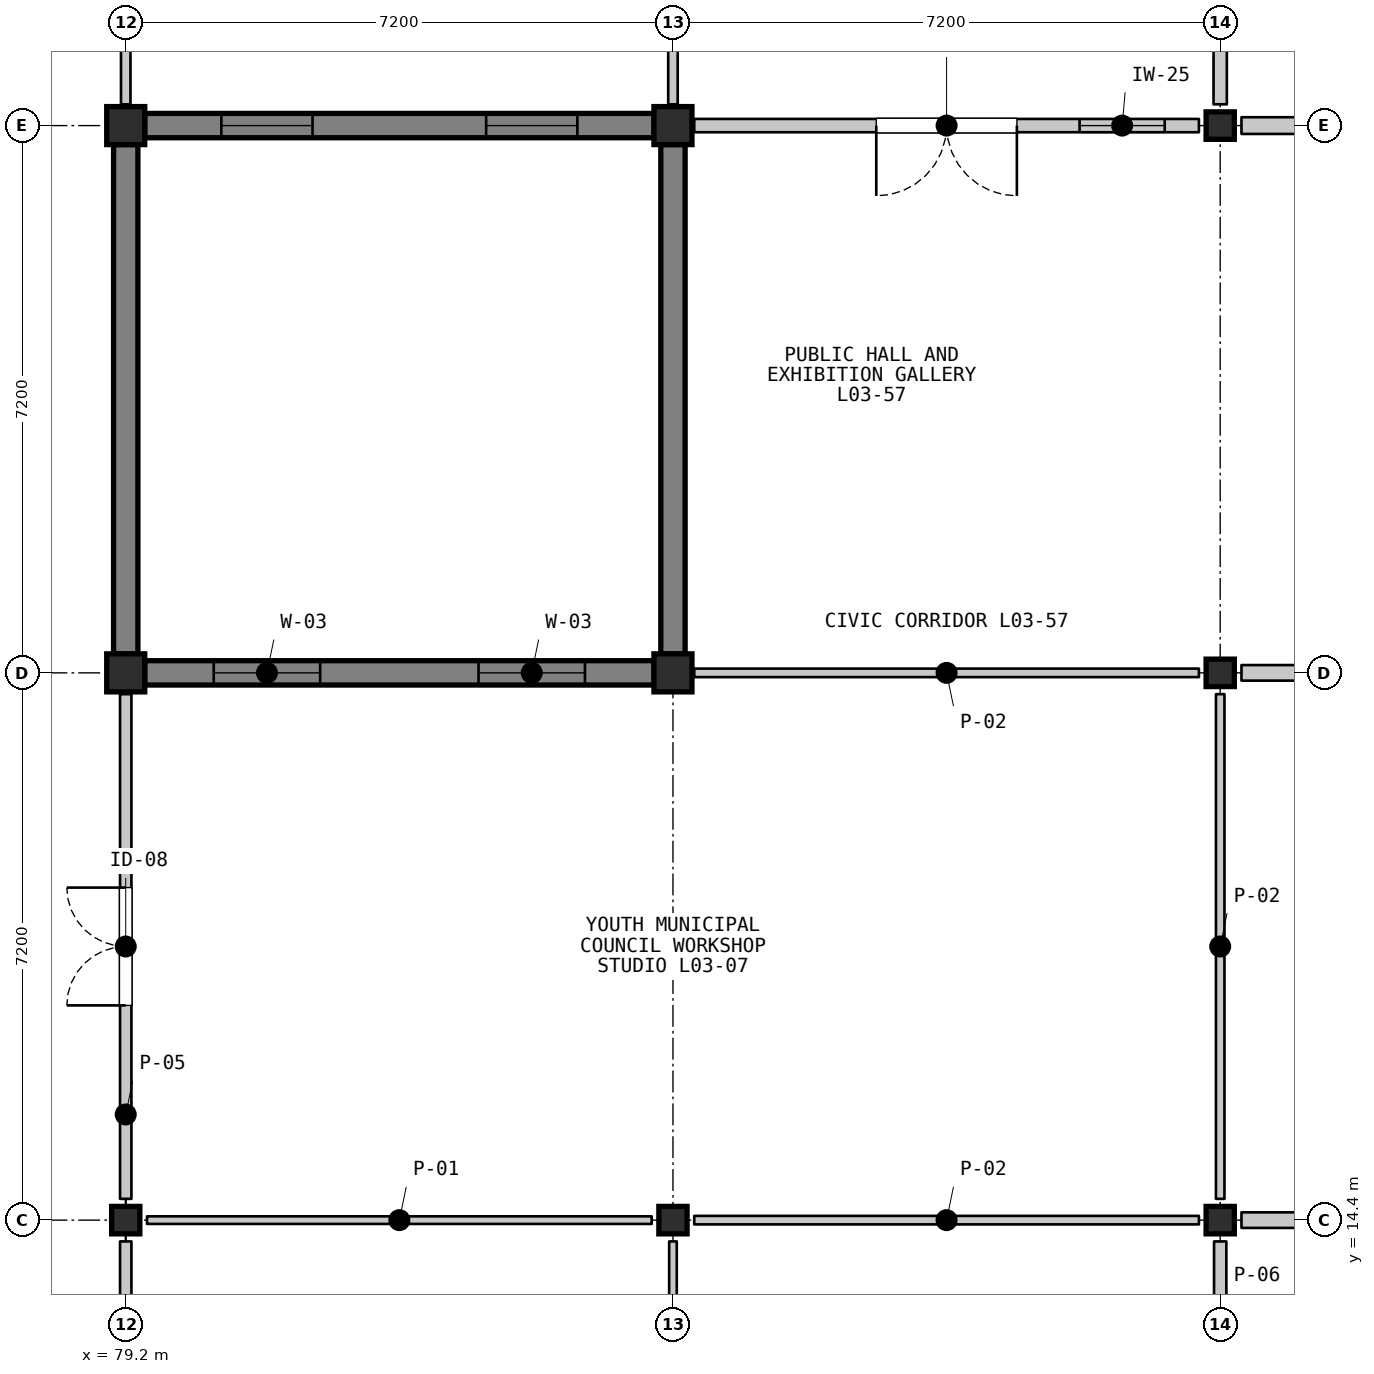
"""IFC4 building model, lengths in metres.
Left out: names, types, materials, properties, quantities, classifications, styles, units other than length and angle.
Written with IfcOpenShell. Run it as: python <this file> out.ifc"""

import sys

from ifc_helpers import new_model, si_unit, direction, frame, frame_2d, origin, origin_2d, place, context, subcontext, project, spatial, rectangle, i_section, extrude, element, fill, save


model = new_model("IFC4")
c1 = context("Model", 3, precision=1e-05, world=origin(), true_north=direction((0.0, 1.0)))
c2 = subcontext(c1, "Body", "Model", "MODEL_VIEW")
j1 = project(units=[si_unit("LENGTHUNIT", "METRE"), si_unit("PLANEANGLEUNIT", "RADIAN")], contexts=[c1])
p1 = place(None, origin())
s1 = spatial("IfcSite", under=j1, at=p1, CompositionType="ELEMENT")
p2 = place(p1, origin())
s2 = spatial("IfcBuilding", under=s1, at=p2, CompositionType="ELEMENT")
p3 = place(p2, frame((0.0, 0.0, 9.9)))
s3 = spatial("IfcBuildingStorey", under=s2, at=p3, CompositionType="ELEMENT", Elevation=9.9)
p4 = place(p3, frame((79.2, 14.4, 0.0), z_axis=(0.0, 0.0, 1.0), x_axis=(1.0, 0.0, 0.0)))
e1 = element("IfcColumn", 1, at=p4, inside=s3, PredefinedType="COLUMN", context=c2, shape_type="SweptSolid", body=[
    extrude(i_section(OverallWidth=0.371, OverallDepth=0.361, WebThickness=0.012, FlangeThickness=0.02, FilletRadius=0.015, at=origin_2d()), origin(), (0.0, 0.0, 1.0), 4.2),
])
for number, where, z_axis, x_axis in (
    (2, (79.2, 21.6, 0.0), (0.0, 0.0, 1.0), (1.0, 0.0, 0.0)),
    (3, (79.2, 28.8, 0.0), (0.0, 0.0, 1.0), (1.0, 0.0, 0.0)),
):
    element("IfcColumn", number, at=place(p3, frame(where, z_axis=z_axis, x_axis=x_axis)), inside=s3, PredefinedType="COLUMN", context=c2, shape_type="SweptSolid", body=[
        extrude(rectangle(XDim=0.5, YDim=0.5, at=origin_2d()), origin(), (0.0, 0.0, 1.0), 4.2),
    ])
p5 = place(p3, frame((86.4, 14.4, 0.0), z_axis=(0.0, 0.0, 1.0), x_axis=(1.0, 0.0, 0.0)))
e4 = element("IfcColumn", 4, at=p5, inside=s3, PredefinedType="COLUMN", context=c2, shape_type="SweptSolid", body=[
    extrude(i_section(OverallWidth=0.371, OverallDepth=0.361, WebThickness=0.012, FlangeThickness=0.02, FilletRadius=0.015, at=origin_2d()), origin(), (0.0, 0.0, 1.0), 4.2),
])
for number, where, z_axis, x_axis in (
    (5, (86.4, 21.6, 0.0), (0.0, 0.0, 1.0), (1.0, 0.0, 0.0)),
    (6, (86.4, 28.8, 0.0), (0.0, 0.0, 1.0), (1.0, 0.0, 0.0)),
):
    element("IfcColumn", number, at=place(p3, frame(where, z_axis=z_axis, x_axis=x_axis)), inside=s3, PredefinedType="COLUMN", context=c2, shape_type="SweptSolid", body=[
        extrude(rectangle(XDim=0.5, YDim=0.5, at=origin_2d()), origin(), (0.0, 0.0, 1.0), 4.2),
    ])
for number, where, z_axis, x_axis in (
    (7, (93.6, 14.4, 0.0), (0.0, 0.0, 1.0), (1.0, 0.0, 0.0)),
    (8, (93.6, 21.6, 0.0), (0.0, 0.0, 1.0), (1.0, 0.0, 0.0)),
    (9, (93.6, 28.8, 0.0), (0.0, 0.0, 1.0), (1.0, 0.0, 0.0)),
):
    element("IfcColumn", number, at=place(p3, frame(where, z_axis=z_axis, x_axis=x_axis)), inside=s3, PredefinedType="COLUMN", context=c2, shape_type="SweptSolid", body=[
        extrude(i_section(OverallWidth=0.371, OverallDepth=0.361, WebThickness=0.012, FlangeThickness=0.02, FilletRadius=0.015, at=origin_2d()), origin(), (0.0, 0.0, 1.0), 4.2),
    ])
p6 = place(p3, frame((79.2, 28.55, 0.0), z_axis=(0.0, 0.0, 1.0), x_axis=(0.0, -1.0, 0.0)))
e10 = element("IfcWall", 10, at=p6, inside=s3, PredefinedType="SOLIDWALL", context=c2, shape_type="SweptSolid", body=[
    extrude(rectangle(XDim=6.7, YDim=0.32, at=frame_2d((3.35, 0.0))), origin(), (0.0, 0.0, 1.0), 3.487),
])
p7 = place(p3, frame((79.45, 21.6, 0.0), z_axis=(0.0, 0.0, 1.0), x_axis=(1.0, 0.0, 0.0)))
e11 = element("IfcWall", 11, at=p7, inside=s3, PredefinedType="SOLIDWALL", context=c2, shape_type="SweptSolid", body=[
    extrude(rectangle(XDim=6.7, YDim=0.32, at=frame_2d((3.35, 0.0))), origin(), (0.0, 0.0, 1.0), 3.418),
])
p8 = place(p7, frame((0.908, 0.0, 0.95)))
e12 = element("IfcOpeningElement", 12, at=p8, cuts=e11, PredefinedType="OPENING", context=c2, shape_type="SweptSolid", body=[
    extrude(rectangle(XDim=1.4, YDim=2.1, at=frame_2d((0.7, 1.05))), frame((0.0, 0.17, 0.0), z_axis=(0.0, -1.0, 0.0), x_axis=(1.0, 0.0, 0.0)), (0.0, 0.0, 1.0), 0.34),
])
p9 = place(p7, frame((4.392, 0.0, 0.95)))
e13 = element("IfcOpeningElement", 13, at=p9, cuts=e11, PredefinedType="OPENING", context=c2, shape_type="SweptSolid", body=[
    extrude(rectangle(XDim=1.4, YDim=2.1, at=frame_2d((0.7, 1.05))), frame((0.0, 0.17, 0.0), z_axis=(0.0, -1.0, 0.0), x_axis=(1.0, 0.0, 0.0)), (0.0, 0.0, 1.0), 0.34),
])
p10 = place(p3, frame((86.15, 28.8, 0.0), z_axis=(0.0, 0.0, 1.0), x_axis=(-1.0, 0.0, 0.0)))
e14 = element("IfcWall", 14, at=p10, inside=s3, PredefinedType="SOLIDWALL", context=c2, shape_type="SweptSolid", body=[
    extrude(rectangle(XDim=6.7, YDim=0.32, at=frame_2d((3.35, 0.0))), origin(), (0.0, 0.0, 1.0), 3.418),
])
p11 = place(p10, frame((1.008, 0.0, 0.95)))
e15 = element("IfcOpeningElement", 15, at=p11, cuts=e14, PredefinedType="OPENING", context=c2, shape_type="SweptSolid", body=[
    extrude(rectangle(XDim=1.2, YDim=1.7, at=frame_2d((0.6, 0.85))), frame((0.0, 0.17, 0.0), z_axis=(0.0, -1.0, 0.0), x_axis=(1.0, 0.0, 0.0)), (0.0, 0.0, 1.0), 0.34),
])
p12 = place(p10, frame((4.492, 0.0, 0.95)))
e16 = element("IfcOpeningElement", 16, at=p12, cuts=e14, PredefinedType="OPENING", context=c2, shape_type="SweptSolid", body=[
    extrude(rectangle(XDim=1.2, YDim=1.7, at=frame_2d((0.6, 0.85))), frame((0.0, 0.17, 0.0), z_axis=(0.0, -1.0, 0.0), x_axis=(1.0, 0.0, 0.0)), (0.0, 0.0, 1.0), 0.34),
])
p13 = place(p3, frame((86.4, 21.85, 0.0), z_axis=(0.0, 0.0, 1.0), x_axis=(0.0, 1.0, 0.0)))
e17 = element("IfcWall", 17, at=p13, inside=s3, PredefinedType="SOLIDWALL", context=c2, shape_type="SweptSolid", body=[
    extrude(rectangle(XDim=6.7, YDim=0.32, at=frame_2d((3.35, 0.0))), origin(), (0.0, 0.0, 1.0), 3.487),
])
p14 = place(p3, frame((79.2, 7.48, 0.0), z_axis=(0.0, 0.0, 1.0), x_axis=(0.0, 1.0, 0.0)))
e18 = element("IfcWall", 18, at=p14, inside=s3, PredefinedType="PARTITIONING", context=c2, shape_type="SweptSolid", body=[
    extrude(rectangle(XDim=6.64, YDim=0.15, at=frame_2d((3.32, 0.0))), origin(), (0.0, 0.0, 1.0), 3.477),
])
p15 = place(p14, frame((2.545, 0.0, 0.0)))
e19 = element("IfcOpeningElement", 19, at=p15, cuts=e18, PredefinedType="OPENING", context=c2, shape_type="SweptSolid", body=[
    extrude(rectangle(XDim=1.55, YDim=2.3, at=frame_2d((0.775, 1.15))), frame((0.0, 0.085, 0.0), z_axis=(0.0, -1.0, 0.0), x_axis=(1.0, 0.0, 0.0)), (0.0, 0.0, 1.0), 0.17),
])
p16 = place(p3, frame((79.48, 14.4, 0.0), z_axis=(0.0, 0.0, 1.0), x_axis=(1.0, 0.0, 0.0)))
e20 = element("IfcWall", 20, at=p16, inside=s3, PredefinedType="PARTITIONING", context=c2, shape_type="SweptSolid", body=[
    extrude(rectangle(XDim=6.64, YDim=0.1, at=frame_2d((3.32, 0.0))), origin(), (0.0, 0.0, 1.0), 3.408),
])
p17 = place(p3, frame((86.4, 14.12, 0.0), z_axis=(0.0, 0.0, 1.0), x_axis=(0.0, -1.0, 0.0)))
e21 = element("IfcWall", 21, at=p17, inside=s3, PredefinedType="PARTITIONING", context=c2, shape_type="SweptSolid", body=[
    extrude(rectangle(XDim=6.64, YDim=0.1, at=frame_2d((3.32, 0.0))), origin(), (0.0, 0.0, 1.0), 3.477),
])
p18 = place(p3, frame((79.2, 14.68, 0.0), z_axis=(0.0, 0.0, 1.0), x_axis=(0.0, 1.0, 0.0)))
e22 = element("IfcWall", 22, at=p18, inside=s3, PredefinedType="PARTITIONING", context=c2, shape_type="SweptSolid", body=[
    extrude(rectangle(XDim=6.64, YDim=0.15, at=frame_2d((3.32, 0.0))), origin(), (0.0, 0.0, 1.0), 3.477),
])
p19 = place(p18, frame((2.545, 0.0, 0.0)))
e23 = element("IfcOpeningElement", 23, at=p19, cuts=e22, PredefinedType="OPENING", context=c2, shape_type="SweptSolid", body=[
    extrude(rectangle(XDim=1.55, YDim=2.3, at=frame_2d((0.775, 1.15))), frame((0.0, 0.085, 0.0), z_axis=(0.0, -1.0, 0.0), x_axis=(1.0, 0.0, 0.0)), (0.0, 0.0, 1.0), 0.17),
])
for number, where, z_axis, x_axis in (
    (24, (93.32, 14.4, 0.0), (0.0, 0.0, 1.0), (-1.0, 0.0, 0.0)),
    (25, (86.68, 21.6, 0.0), (0.0, 0.0, 1.0), (1.0, 0.0, 0.0)),
):
    element("IfcWall", number, at=place(p3, frame(where, z_axis=z_axis, x_axis=x_axis)), inside=s3, PredefinedType="PARTITIONING", context=c2, shape_type="SweptSolid", body=[
        extrude(rectangle(XDim=6.64, YDim=0.112, at=frame_2d((3.32, 0.0))), origin(), (0.0, 0.0, 1.0), 3.408),
    ])
p20 = place(p3, frame((93.6, 21.32, 0.0), z_axis=(0.0, 0.0, 1.0), x_axis=(0.0, -1.0, 0.0)))
e26 = element("IfcWall", 26, at=p20, inside=s3, PredefinedType="PARTITIONING", context=c2, shape_type="SweptSolid", body=[
    extrude(rectangle(XDim=6.64, YDim=0.112, at=frame_2d((3.32, 0.0))), origin(), (0.0, 0.0, 1.0), 3.477),
])
p21 = place(p3, frame((79.2, 29.08, 0.0), z_axis=(0.0, 0.0, 1.0), x_axis=(0.0, 1.0, 0.0)))
e27 = element("IfcWall", 27, at=p21, inside=s3, PredefinedType="PARTITIONING", context=c2, shape_type="SweptSolid", body=[
    extrude(rectangle(XDim=6.8, YDim=0.125, at=frame_2d((3.4, 0.0))), origin(), (0.0, 0.0, 1.0), 3.408),
])
p22 = place(p21, frame((2.475, 0.0, 0.0)))
e28 = element("IfcOpeningElement", 28, at=p22, cuts=e27, PredefinedType="OPENING", context=c2, shape_type="SweptSolid", body=[
    extrude(rectangle(XDim=1.85, YDim=2.45, at=frame_2d((0.925, 1.225))), frame((0.0, 0.073, 0.0), z_axis=(0.0, -1.0, 0.0), x_axis=(1.0, 0.0, 0.0)), (0.0, 0.0, 1.0), 0.145),
])
p23 = place(p3, frame((86.4, 35.88, 0.0), z_axis=(0.0, 0.0, 1.0), x_axis=(0.0, -1.0, 0.0)))
e29 = element("IfcWall", 29, at=p23, inside=s3, PredefinedType="PARTITIONING", context=c2, shape_type="SweptSolid", body=[
    extrude(rectangle(XDim=6.8, YDim=0.125, at=frame_2d((3.4, 0.0))), origin(), (0.0, 0.0, 1.0), 3.408),
])
p24 = place(p3, frame((93.6, 14.12, 0.0), z_axis=(0.0, 0.0, 1.0), x_axis=(0.0, -1.0, 0.0)))
e30 = element("IfcWall", 30, at=p24, inside=s3, PredefinedType="PARTITIONING", context=c2, shape_type="SweptSolid", body=[
    extrude(rectangle(XDim=6.64, YDim=0.162, at=frame_2d((3.32, 0.0))), origin(), (0.0, 0.0, 1.0), 3.477),
])
p25 = place(p24, frame((2.545, 0.0, 0.0)))
e31 = element("IfcOpeningElement", 31, at=p25, cuts=e30, PredefinedType="OPENING", context=c2, shape_type="SweptSolid", body=[
    extrude(rectangle(XDim=1.55, YDim=2.3, at=frame_2d((0.775, 1.15))), frame((0.0, 0.091, 0.0), z_axis=(0.0, -1.0, 0.0), x_axis=(1.0, 0.0, 0.0)), (0.0, 0.0, 1.0), 0.182),
])
p26 = place(p3, frame((93.32, 28.8, 0.0), z_axis=(0.0, 0.0, 1.0), x_axis=(-1.0, 0.0, 0.0)))
e32 = element("IfcWall", 32, at=p26, inside=s3, PredefinedType="PARTITIONING", context=c2, shape_type="SweptSolid", body=[
    extrude(rectangle(XDim=6.64, YDim=0.175, at=frame_2d((3.32, 0.0))), origin(), (0.0, 0.0, 1.0), 3.408),
])
p27 = place(p26, frame((2.395, 0.0, 0.0)))
e33 = element("IfcOpeningElement", 33, at=p27, cuts=e32, PredefinedType="OPENING", context=c2, shape_type="SweptSolid", body=[
    extrude(rectangle(XDim=1.85, YDim=2.45, at=frame_2d((0.925, 1.225))), frame((0.0, 0.097, 0.0), z_axis=(0.0, -1.0, 0.0), x_axis=(1.0, 0.0, 0.0)), (0.0, 0.0, 1.0), 0.195),
])
p28 = place(p26, frame((0.45, 0.0, 1.05)))
e34 = element("IfcOpeningElement", 34, at=p28, cuts=e32, PredefinedType="OPENING", context=c2, shape_type="SweptSolid", body=[
    extrude(rectangle(XDim=1.12, YDim=0.92, at=frame_2d((0.56, 0.46))), frame((0.0, 0.097, 0.0), z_axis=(0.0, -1.0, 0.0), x_axis=(1.0, 0.0, 0.0)), (0.0, 0.0, 1.0), 0.195),
])
p29 = place(p3, frame((93.6, 35.88, 0.0), z_axis=(0.0, 0.0, 1.0), x_axis=(0.0, -1.0, 0.0)))
e35 = element("IfcWall", 35, at=p29, inside=s3, PredefinedType="PARTITIONING", context=c2, shape_type="SweptSolid", body=[
    extrude(rectangle(XDim=6.8, YDim=0.175, at=frame_2d((3.4, 0.0))), origin(), (0.0, 0.0, 1.0), 3.408),
])
p30 = place(p3, frame((100.68, 14.4, 0.0), z_axis=(0.0, 0.0, 1.0), x_axis=(-1.0, 0.0, 0.0)))
e36 = element("IfcWall", 36, at=p30, inside=s3, PredefinedType="PARTITIONING", context=c2, shape_type="SweptSolid", body=[
    extrude(rectangle(XDim=6.8, YDim=0.205, at=frame_2d((3.4, 0.0))), origin(), (0.0, 0.0, 1.0), 3.408),
])
p31 = place(p30, frame((2.625, 0.0, 0.0)))
e37 = element("IfcOpeningElement", 37, at=p31, cuts=e36, PredefinedType="OPENING", context=c2, shape_type="SweptSolid", body=[
    extrude(rectangle(XDim=1.55, YDim=2.3, at=frame_2d((0.775, 1.15))), frame((0.0, 0.113, 0.0), z_axis=(0.0, -1.0, 0.0), x_axis=(1.0, 0.0, 0.0)), (0.0, 0.0, 1.0), 0.225),
])
p32 = place(p30, frame((0.45, 0.0, 1.05)))
e38 = element("IfcOpeningElement", 38, at=p32, cuts=e36, PredefinedType="OPENING", context=c2, shape_type="SweptSolid", body=[
    extrude(rectangle(XDim=1.32, YDim=0.92, at=frame_2d((0.66, 0.46))), frame((0.0, 0.113, 0.0), z_axis=(0.0, -1.0, 0.0), x_axis=(1.0, 0.0, 0.0)), (0.0, 0.0, 1.0), 0.225),
])
p33 = place(p3, frame((93.88, 21.6, 0.0), z_axis=(0.0, 0.0, 1.0), x_axis=(1.0, 0.0, 0.0)))
e39 = element("IfcWall", 39, at=p33, inside=s3, PredefinedType="PARTITIONING", context=c2, shape_type="SweptSolid", body=[
    extrude(rectangle(XDim=6.8, YDim=0.205, at=frame_2d((3.4, 0.0))), origin(), (0.0, 0.0, 1.0), 3.408),
])
p34 = place(p3, frame((100.68, 28.8, 0.0), z_axis=(0.0, 0.0, 1.0), x_axis=(-1.0, 0.0, 0.0)))
e40 = element("IfcWall", 40, at=p34, inside=s3, PredefinedType="PARTITIONING", context=c2, shape_type="SweptSolid", body=[
    extrude(rectangle(XDim=6.8, YDim=0.22, at=frame_2d((3.4, 0.0))), origin(), (0.0, 0.0, 1.0), 3.408),
])
p35 = place(p34, frame((2.625, 0.0, 0.0)))
e41 = element("IfcOpeningElement", 41, at=p35, cuts=e40, PredefinedType="OPENING", context=c2, shape_type="SweptSolid", body=[
    extrude(rectangle(XDim=1.55, YDim=2.3, at=frame_2d((0.775, 1.15))), frame((0.0, 0.12, 0.0), z_axis=(0.0, -1.0, 0.0), x_axis=(1.0, 0.0, 0.0)), (0.0, 0.0, 1.0), 0.24),
])
p36 = place(p34, frame((0.45, 0.0, 1.05)))
e42 = element("IfcOpeningElement", 42, at=p36, cuts=e40, PredefinedType="OPENING", context=c2, shape_type="SweptSolid", body=[
    extrude(rectangle(XDim=1.42, YDim=0.96, at=frame_2d((0.71, 0.48))), frame((0.0, 0.12, 0.0), z_axis=(0.0, -1.0, 0.0), x_axis=(1.0, 0.0, 0.0)), (0.0, 0.0, 1.0), 0.24),
])
p37 = place(p8, origin())
e43 = element("IfcWindow", 43, at=p37, inside=s3, PartitioningType="SINGLE_PANEL", PredefinedType="WINDOW", context=c2, shape_type="SweptSolid", body=[
    extrude(rectangle(XDim=1.4, YDim=2.1, at=frame_2d((0.7, 1.05))), frame((0.0, 0.03, 0.0), z_axis=(0.0, -1.0, 0.0), x_axis=(1.0, 0.0, 0.0)), (0.0, 0.0, 1.0), 0.06),
])
fill(e12, e43)
p38 = place(p9, origin())
e44 = element("IfcWindow", 44, at=p38, inside=s3, PartitioningType="SINGLE_PANEL", PredefinedType="WINDOW", context=c2, shape_type="SweptSolid", body=[
    extrude(rectangle(XDim=1.4, YDim=2.1, at=frame_2d((0.7, 1.05))), frame((0.0, 0.03, 0.0), z_axis=(0.0, -1.0, 0.0), x_axis=(1.0, 0.0, 0.0)), (0.0, 0.0, 1.0), 0.06),
])
fill(e13, e44)
p39 = place(p11, origin())
e45 = element("IfcWindow", 45, at=p39, inside=s3, PartitioningType="SINGLE_PANEL", PredefinedType="WINDOW", context=c2, shape_type="SweptSolid", body=[
    extrude(rectangle(XDim=1.2, YDim=1.7, at=frame_2d((0.6, 0.85))), frame((0.0, 0.03, 0.0), z_axis=(0.0, -1.0, 0.0), x_axis=(1.0, 0.0, 0.0)), (0.0, 0.0, 1.0), 0.06),
])
fill(e15, e45)
p40 = place(p12, origin())
e46 = element("IfcWindow", 46, at=p40, inside=s3, PartitioningType="SINGLE_PANEL", PredefinedType="WINDOW", context=c2, shape_type="SweptSolid", body=[
    extrude(rectangle(XDim=1.2, YDim=1.7, at=frame_2d((0.6, 0.85))), frame((0.0, 0.03, 0.0), z_axis=(0.0, -1.0, 0.0), x_axis=(1.0, 0.0, 0.0)), (0.0, 0.0, 1.0), 0.06),
])
fill(e16, e46)
p41 = place(p19, origin())
e47 = element("IfcDoor", 47, at=p41, inside=s3, OperationType="DOUBLE_DOOR_SINGLE_SWING", PredefinedType="DOOR", context=c2, shape_type="SweptSolid", body=[
    extrude(rectangle(XDim=1.55, YDim=2.3, at=frame_2d((0.775, 1.15))), frame((0.0, 0.025, 0.0), z_axis=(0.0, -1.0, 0.0), x_axis=(1.0, 0.0, 0.0)), (0.0, 0.0, 1.0), 0.05),
])
fill(e23, e47)
p42 = place(p27, origin())
e48 = element("IfcDoor", 48, at=p42, inside=s3, OperationType="DOUBLE_DOOR_SINGLE_SWING", PredefinedType="DOOR", context=c2, shape_type="SweptSolid", body=[
    extrude(rectangle(XDim=1.85, YDim=2.45, at=frame_2d((0.925, 1.225))), frame((0.0, 0.025, 0.0), z_axis=(0.0, -1.0, 0.0), x_axis=(1.0, 0.0, 0.0)), (0.0, 0.0, 1.0), 0.05),
])
fill(e33, e48)
p43 = place(p28, origin())
e49 = element("IfcWindow", 49, at=p43, inside=s3, PartitioningType="SINGLE_PANEL", PredefinedType="WINDOW", context=c2, shape_type="SweptSolid", body=[
    extrude(rectangle(XDim=1.12, YDim=0.92, at=frame_2d((0.56, 0.46))), frame((0.0, 0.03, 0.0), z_axis=(0.0, -1.0, 0.0), x_axis=(1.0, 0.0, 0.0)), (0.0, 0.0, 1.0), 0.06),
])
fill(e34, e49)
save(model, sys.argv[1])
